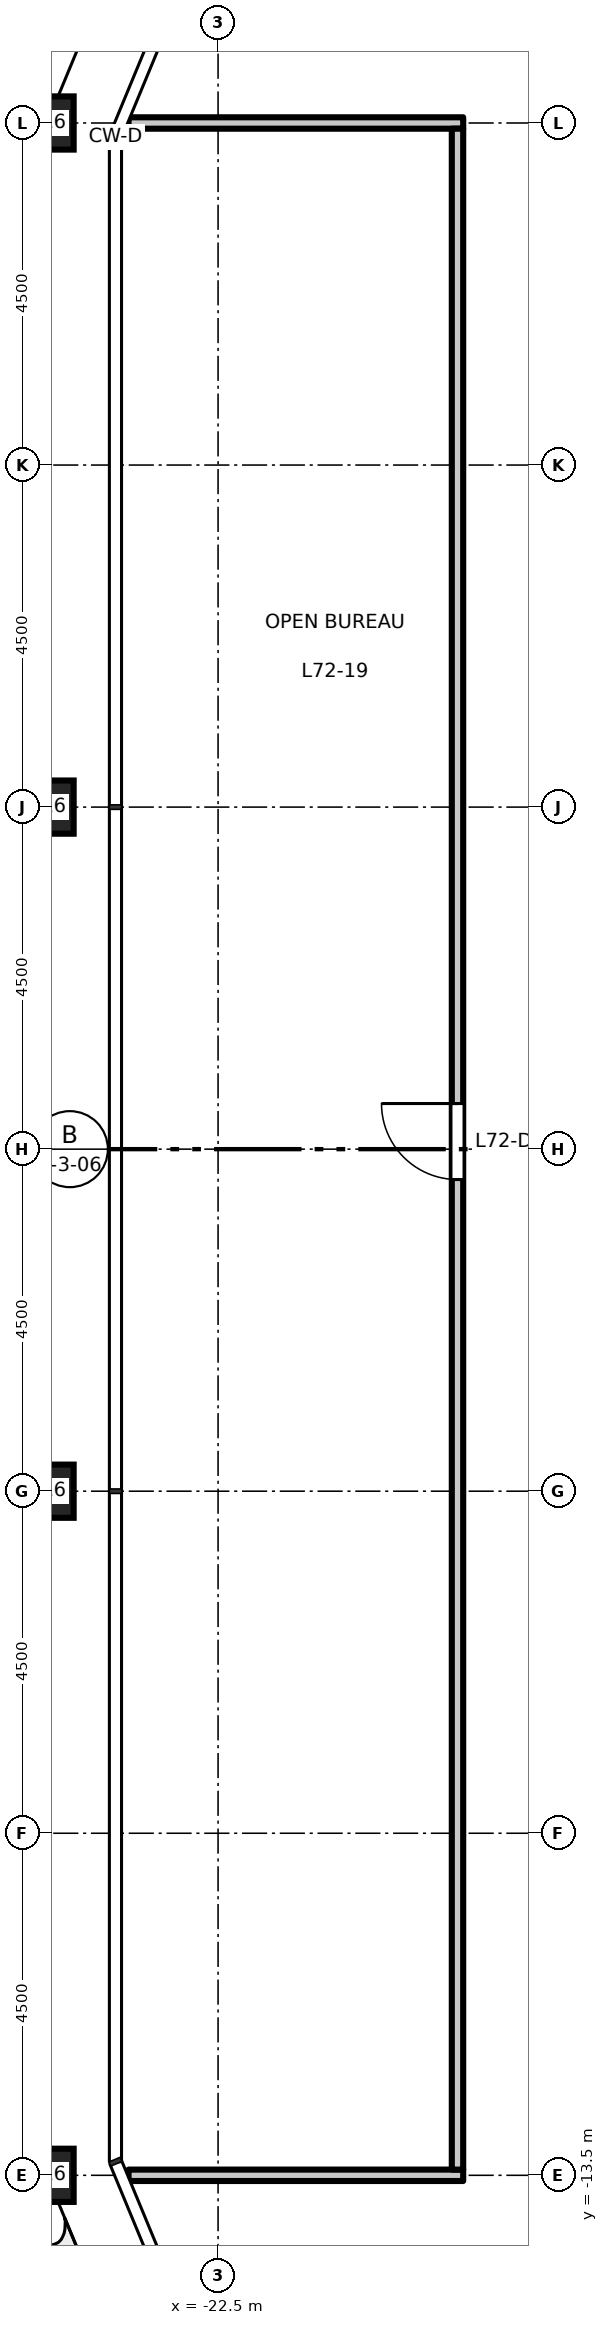
"""IFC4 building model, lengths in metres.
Left out: names, types, materials, properties, quantities, classifications, styles, units other than length and angle.
Written with IfcOpenShell. Run it as: python <this file> out.ifc"""

import sys

from ifc_helpers import new_model, si_unit, direction, frame, frame_2d, origin, origin_2d, place, context, subcontext, project, spatial, rectangle, hollow_rectangle, extrude, element, fill, save


model = new_model("IFC4")
c1 = context("Model", 3, precision=1e-05, world=origin(), true_north=direction((0.0, 1.0)))
c2 = subcontext(c1, "Body", "Model", "MODEL_VIEW")
j1 = project(units=[si_unit("LENGTHUNIT", "METRE"), si_unit("PLANEANGLEUNIT", "RADIAN")], contexts=[c1])
p1 = place(None, origin())
s1 = spatial("IfcSite", under=j1, at=p1, CompositionType="ELEMENT")
p2 = place(p1, origin())
s2 = spatial("IfcBuilding", under=s1, at=p2, CompositionType="ELEMENT")
p3 = place(p2, frame((0.0, 0.0, 334.7)))
s3 = spatial("IfcBuildingStorey", under=s2, at=p3, CompositionType="ELEMENT", Elevation=334.7)
for number, where, z_axis, x_axis in (
    (1, (-24.75, 13.5, 0.0), (0.0, 0.0, 1.0), (1.0, 0.0, 0.0)),
    (2, (-24.75, 4.5, 0.0), (0.0, 0.0, 1.0), (1.0, 0.0, 0.0)),
    (3, (-24.75, -4.5, 0.0), (0.0, 0.0, 1.0), (1.0, 0.0, 0.0)),
    (4, (-24.75, -13.5, 0.0), (0.0, 0.0, 1.0), (1.0, 0.0, 0.0)),
):
    element("IfcColumn", number, at=place(p3, frame(where, z_axis=z_axis, x_axis=x_axis)), inside=s3, PredefinedType="COLUMN", context=c2, shape_type="SweptSolid", body=[
        extrude(hollow_rectangle(XDim=0.7, YDim=0.7, WallThickness=0.036, at=origin_2d()), origin(), (0.0, 0.0, 1.0), 4.5),
    ])
for number, where, z_axis, x_axis in (
    (5, (-23.678, -13.5, 0.0), (0.0, 0.0, 1.0), (1.0, 0.0, 0.0)),
    (6, (-23.678, 13.5, 0.0), (0.0, 0.0, 1.0), (1.0, 0.0, 0.0)),
):
    element("IfcWall", number, at=place(p3, frame(where, z_axis=z_axis, x_axis=x_axis)), inside=s3, PredefinedType="PARTITIONING", context=c2, shape_type="SweptSolid", body=[
        extrude(rectangle(XDim=4.403, YDim=0.15, at=frame_2d((2.202, 0.0))), origin(), (0.0, 0.0, 1.0), 4.35),
    ])
p4 = place(p3, frame((-19.35, -13.425, 0.0), z_axis=(0.0, 0.0, 1.0), x_axis=(0.0, 1.0, 0.0)))
e7 = element("IfcWall", 7, at=p4, inside=s3, PredefinedType="PARTITIONING", context=c2, shape_type="SweptSolid", body=[
    extrude(rectangle(XDim=26.85, YDim=0.15, at=frame_2d((13.425, 0.0))), origin(), (0.0, 0.0, 1.0), 4.35),
])
p5 = place(p4, frame((13.025, 0.0, 0.0)))
e8 = element("IfcOpeningElement", 8, at=p5, cuts=e7, PredefinedType="OPENING", context=c2, shape_type="SweptSolid", body=[
    extrude(rectangle(XDim=1.0, YDim=2.1, at=frame_2d((0.5, 1.05))), frame((0.0, 0.085, 0.0), z_axis=(0.0, -1.0, 0.0), x_axis=(1.0, 0.0, 0.0)), (0.0, 0.0, 1.0), 0.17),
])
p6 = place(p5, origin())
e9 = element("IfcDoor", 9, at=p6, inside=s3, OperationType="SINGLE_SWING_RIGHT", PredefinedType="DOOR", context=c2, shape_type="SweptSolid", body=[
    extrude(rectangle(XDim=1.0, YDim=2.1, at=frame_2d((0.5, 1.05))), frame((0.0, 0.025, 0.0), z_axis=(0.0, -1.0, 0.0), x_axis=(1.0, 0.0, 0.0)), (0.0, 0.0, 1.0), 0.05),
])
fill(e8, e9)
save(model, sys.argv[1])
